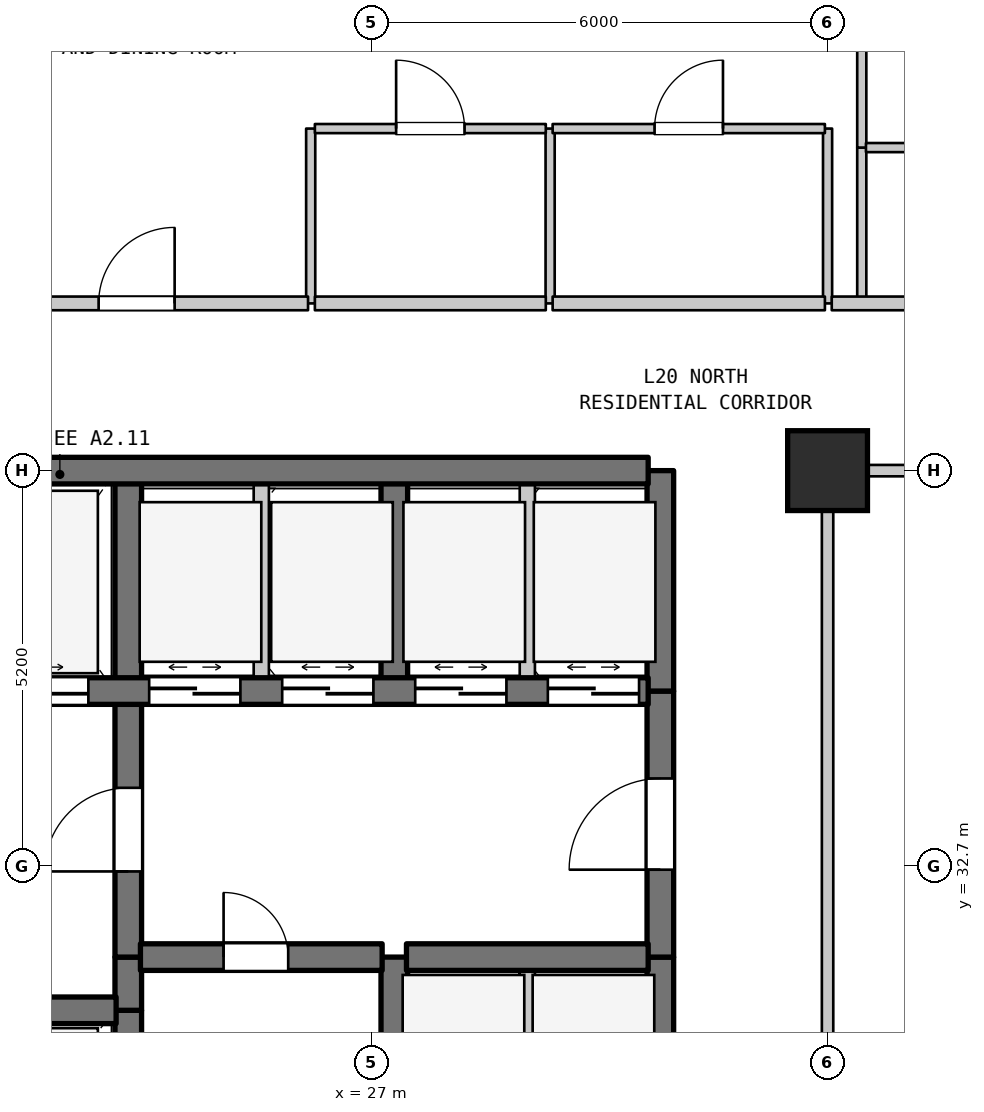
"""IFC4 building model, lengths in metres.
Left out: names, types, materials, properties, quantities, classifications, styles, units other than length and angle.
Written with IfcOpenShell. Run it as: python <this file> out.ifc"""

import sys

from ifc_helpers import new_model, si_unit, direction, frame, frame_2d, origin, origin_2d, place, context, subcontext, project, spatial, rectangle, extrude, element, fill, save


model = new_model("IFC4")
c1 = context("Model", 3, precision=1e-05, world=origin(), true_north=direction((0.0, 1.0)))
c2 = subcontext(c1, "Body", "Model", "MODEL_VIEW")
j1 = project(units=[si_unit("LENGTHUNIT", "METRE"), si_unit("PLANEANGLEUNIT", "RADIAN")], contexts=[c1])
p1 = place(None, origin())
s1 = spatial("IfcSite", under=j1, at=p1, CompositionType="ELEMENT")
p2 = place(p1, origin())
s2 = spatial("IfcBuilding", under=s1, at=p2, CompositionType="ELEMENT")
p3 = place(p2, frame((0.0, 0.0, 86.4)))
s3 = spatial("IfcBuildingStorey", under=s2, at=p3, CompositionType="ELEMENT", Elevation=86.4)
p4 = place(p3, frame((33.0, 37.9, 0.0), z_axis=(0.0, 0.0, 1.0), x_axis=(1.0, 0.0, 0.0)))
e1 = element("IfcColumn", 1, at=p4, inside=s3, PredefinedType="COLUMN", context=c2, shape_type="SweptSolid", body=[
    extrude(rectangle(XDim=1.05, YDim=1.05, at=origin_2d()), origin(), (0.0, 0.0, 1.0), 4.5),
])
p5 = place(p3, frame((23.8, 29.5, 0.0), z_axis=(0.0, 0.0, 1.0), x_axis=(0.0, 1.0, 0.0)))
e2 = element("IfcWall", 2, at=p5, inside=s3, PredefinedType="SHEAR", context=c2, shape_type="SweptSolid", body=[
    extrude(rectangle(XDim=1.3, YDim=0.35, at=frame_2d((0.65, 0.0))), origin(), (0.0, 0.0, 1.0), 4.185),
])
p6 = place(p3, frame((23.8, 30.8, 0.0), z_axis=(0.0, 0.0, 1.0), x_axis=(0.0, 1.0, 0.0)))
e3 = element("IfcWall", 3, at=p6, inside=s3, PredefinedType="SHEAR", context=c2, shape_type="SweptSolid", body=[
    extrude(rectangle(XDim=0.7, YDim=0.35, at=frame_2d((0.35, 0.0))), origin(), (0.0, 0.0, 1.0), 4.185),
])
p7 = place(p3, frame((23.8, 31.5, 0.0), z_axis=(0.0, 0.0, 1.0), x_axis=(0.0, 1.0, 0.0)))
e4 = element("IfcWall", 4, at=p7, inside=s3, PredefinedType="SHEAR", context=c2, shape_type="SweptSolid", body=[
    extrude(rectangle(XDim=3.5, YDim=0.35, at=frame_2d((1.75, 0.0))), origin(), (0.0, 0.0, 1.0), 4.185),
])
p8 = place(p7, frame((1.127, 0.0, 0.0)))
e5 = element("IfcOpeningElement", 5, at=p8, cuts=e4, PredefinedType="OPENING", context=c2, shape_type="SweptSolid", body=[
    extrude(rectangle(XDim=1.1, YDim=2.15, at=frame_2d((0.55, 1.075))), frame((0.0, 0.185, 0.0), z_axis=(0.0, -1.0, 0.0), x_axis=(1.0, 0.0, 0.0)), (0.0, 0.0, 1.0), 0.37),
])
p9 = place(p3, frame((23.8, 35.0, 0.0), z_axis=(0.0, 0.0, 1.0), x_axis=(0.0, 1.0, 0.0)))
e6 = element("IfcWall", 6, at=p9, inside=s3, PredefinedType="SHEAR", context=c2, shape_type="SweptSolid", body=[
    extrude(rectangle(XDim=2.9, YDim=0.35, at=frame_2d((1.45, 0.0))), origin(), (0.0, 0.0, 1.0), 4.185),
])
p10 = place(p3, frame((25.55, 35.0, 0.0), z_axis=(0.0, 0.0, 1.0), x_axis=(0.0, 1.0, 0.0)))
e7 = element("IfcWall", 7, at=p10, inside=s3, PredefinedType="STANDARD", context=c2, shape_type="SweptSolid", body=[
    extrude(rectangle(XDim=2.9, YDim=0.2, at=frame_2d((1.45, 0.0))), origin(), (0.0, 0.0, 1.0), 4.185),
])
p11 = place(p3, frame((26.2, 40.1, 0.0), z_axis=(0.0, 0.0, 1.0), x_axis=(0.0, 1.0, 0.0)))
e8 = element("IfcWall", 8, at=p11, inside=s3, PredefinedType="PARTITIONING", context=c2, shape_type="SweptSolid", body=[
    extrude(rectangle(XDim=2.3, YDim=0.12, at=frame_2d((1.15, 0.0))), origin(), (0.0, 0.0, 1.0), 4.185),
])
p12 = place(p3, frame((27.3, 29.5, 0.0), z_axis=(0.0, 0.0, 1.0), x_axis=(0.0, 1.0, 0.0)))
e9 = element("IfcWall", 9, at=p12, inside=s3, PredefinedType="SHEAR", context=c2, shape_type="SweptSolid", body=[
    extrude(rectangle(XDim=2.0, YDim=0.35, at=frame_2d((1.0, 0.0))), origin(), (0.0, 0.0, 1.0), 4.185),
])
p13 = place(p3, frame((27.3, 35.0, 0.0), z_axis=(0.0, 0.0, 1.0), x_axis=(0.0, 1.0, 0.0)))
e10 = element("IfcWall", 10, at=p13, inside=s3, PredefinedType="SHEAR", context=c2, shape_type="SweptSolid", body=[
    extrude(rectangle(XDim=2.9, YDim=0.35, at=frame_2d((1.45, 0.0))), origin(), (0.0, 0.0, 1.0), 4.185),
])
p14 = place(p3, frame((29.05, 28.9, 0.0), z_axis=(0.0, 0.0, 1.0), x_axis=(0.0, 1.0, 0.0)))
e11 = element("IfcWall", 11, at=p14, inside=s3, PredefinedType="STANDARD", context=c2, shape_type="SweptSolid", body=[
    extrude(rectangle(XDim=2.6, YDim=0.2, at=frame_2d((1.3, 0.0))), origin(), (0.0, 0.0, 1.0), 4.185),
])
p15 = place(p3, frame((29.05, 35.0, 0.0), z_axis=(0.0, 0.0, 1.0), x_axis=(0.0, 1.0, 0.0)))
e12 = element("IfcWall", 12, at=p15, inside=s3, PredefinedType="STANDARD", context=c2, shape_type="SweptSolid", body=[
    extrude(rectangle(XDim=2.9, YDim=0.2, at=frame_2d((1.45, 0.0))), origin(), (0.0, 0.0, 1.0), 4.185),
])
p16 = place(p3, frame((29.35, 40.1, 0.0), z_axis=(0.0, 0.0, 1.0), x_axis=(0.0, 1.0, 0.0)))
e13 = element("IfcWall", 13, at=p16, inside=s3, PredefinedType="PARTITIONING", context=c2, shape_type="SweptSolid", body=[
    extrude(rectangle(XDim=2.3, YDim=0.12, at=frame_2d((1.15, 0.0))), origin(), (0.0, 0.0, 1.0), 4.185),
])
p17 = place(p3, frame((30.8, 28.9, 0.0), z_axis=(0.0, 0.0, 1.0), x_axis=(0.0, 1.0, 0.0)))
e14 = element("IfcWall", 14, at=p17, inside=s3, PredefinedType="SHEAR", context=c2, shape_type="SweptSolid", body=[
    extrude(rectangle(XDim=2.6, YDim=0.35, at=frame_2d((1.3, 0.0))), origin(), (0.0, 0.0, 1.0), 4.185),
])
p18 = place(p3, frame((30.8, 31.5, 0.0), z_axis=(0.0, 0.0, 1.0), x_axis=(0.0, 1.0, 0.0)))
e15 = element("IfcWall", 15, at=p18, inside=s3, PredefinedType="SHEAR", context=c2, shape_type="SweptSolid", body=[
    extrude(rectangle(XDim=3.5, YDim=0.35, at=frame_2d((1.75, 0.0))), origin(), (0.0, 0.0, 1.0), 4.185),
])
p19 = place(p18, frame((1.15, 0.0, 0.0)))
e16 = element("IfcOpeningElement", 16, at=p19, cuts=e15, PredefinedType="OPENING", context=c2, shape_type="SweptSolid", body=[
    extrude(rectangle(XDim=1.2, YDim=2.2, at=frame_2d((0.6, 1.1))), frame((0.0, 0.185, 0.0), z_axis=(0.0, -1.0, 0.0), x_axis=(1.0, 0.0, 0.0)), (0.0, 0.0, 1.0), 0.37),
])
p20 = place(p3, frame((30.8, 35.0, 0.0), z_axis=(0.0, 0.0, 1.0), x_axis=(0.0, 1.0, 0.0)))
e17 = element("IfcWall", 17, at=p20, inside=s3, PredefinedType="SHEAR", context=c2, shape_type="SweptSolid", body=[
    extrude(rectangle(XDim=2.9, YDim=0.35, at=frame_2d((1.45, 0.0))), origin(), (0.0, 0.0, 1.0), 4.185),
])
p21 = place(p3, frame((33.0, 27.91, 0.0), z_axis=(0.0, 0.0, 1.0), x_axis=(0.0, 1.0, 0.0)))
e18 = element("IfcWall", 18, at=p21, inside=s3, PredefinedType="STANDARD", context=c2, shape_type="SweptSolid", body=[
    extrude(rectangle(XDim=9.98, YDim=0.15, at=frame_2d((4.99, 0.0))), origin(), (0.0, 0.0, 1.0), 3.685),
])
p22 = place(p3, frame((33.0, 40.1, 0.0), z_axis=(0.0, 0.0, 1.0), x_axis=(0.0, 1.0, 0.0)))
e19 = element("IfcWall", 19, at=p22, inside=s3, PredefinedType="PARTITIONING", context=c2, shape_type="SweptSolid", body=[
    extrude(rectangle(XDim=2.3, YDim=0.12, at=frame_2d((1.15, 0.0))), origin(), (0.0, 0.0, 1.0), 3.585),
])
p23 = place(p3, frame((33.45, 40.1, 0.0), z_axis=(0.0, 0.0, 1.0), x_axis=(0.0, 1.0, 0.0)))
e20 = element("IfcWall", 20, at=p23, inside=s3, PredefinedType="PARTITIONING", context=c2, shape_type="SweptSolid", body=[
    extrude(rectangle(XDim=2.05, YDim=0.12, at=frame_2d((1.025, 0.0))), origin(), (0.0, 0.0, 1.0), 4.185),
])
p24 = place(p3, frame((33.45, 42.15, 0.0), z_axis=(0.0, 0.0, 1.0), x_axis=(0.0, 1.0, 0.0)))
e21 = element("IfcWall", 21, at=p24, inside=s3, PredefinedType="PARTITIONING", context=c2, shape_type="SweptSolid", body=[
    extrude(rectangle(XDim=3.3, YDim=0.12, at=frame_2d((1.65, 0.0))), origin(), (0.0, 0.0, 1.0), 4.185),
])
p25 = place(p3, frame((19.16, 30.8, 0.0), z_axis=(0.0, 0.0, 1.0), x_axis=(1.0, 0.0, 0.0)))
e22 = element("IfcWall", 22, at=p25, inside=s3, PredefinedType="SHEAR", context=c2, shape_type="SweptSolid", body=[
    extrude(rectangle(XDim=4.48, YDim=0.35, at=frame_2d((2.24, 0.0))), origin(), (0.0, 0.0, 1.0), 4.185),
])
p26 = place(p3, frame((23.96, 31.5, 0.0), z_axis=(0.0, 0.0, 1.0), x_axis=(1.0, 0.0, 0.0)))
e23 = element("IfcWall", 23, at=p26, inside=s3, PredefinedType="SHEAR", context=c2, shape_type="SweptSolid", body=[
    extrude(rectangle(XDim=3.18, YDim=0.35, at=frame_2d((1.59, 0.0))), origin(), (0.0, 0.0, 1.0), 4.185),
])
p27 = place(p26, frame((1.094, 0.0, 0.0)))
e24 = element("IfcOpeningElement", 24, at=p27, cuts=e23, PredefinedType="OPENING", context=c2, shape_type="SweptSolid", body=[
    extrude(rectangle(XDim=0.85, YDim=2.1, at=frame_2d((0.425, 1.05))), frame((0.0, 0.185, 0.0), z_axis=(0.0, -1.0, 0.0), x_axis=(1.0, 0.0, 0.0)), (0.0, 0.0, 1.0), 0.37),
])
p28 = place(p3, frame((27.46, 31.5, 0.0), z_axis=(0.0, 0.0, 1.0), x_axis=(1.0, 0.0, 0.0)))
e25 = element("IfcWall", 25, at=p28, inside=s3, PredefinedType="SHEAR", context=c2, shape_type="SweptSolid", body=[
    extrude(rectangle(XDim=3.18, YDim=0.35, at=frame_2d((1.59, 0.0))), origin(), (0.0, 0.0, 1.0), 4.185),
])
p29 = place(p3, frame((19.16, 35.0, 0.0), z_axis=(0.0, 0.0, 1.0), x_axis=(1.0, 0.0, 0.0)))
e26 = element("IfcWall", 26, at=p29, inside=s3, PredefinedType="SHEAR", context=c2, shape_type="SweptSolid", body=[
    extrude(rectangle(XDim=11.48, YDim=0.35, at=frame_2d((5.74, 0.0))), origin(), (0.0, 0.0, 1.0), 4.185),
])
p30 = place(p29, frame((0.365, 0.0, 0.0)))
e27 = element("IfcOpeningElement", 27, at=p30, cuts=e26, PredefinedType="OPENING", context=c2, shape_type="SweptSolid", body=[
    extrude(rectangle(XDim=1.35, YDim=2.2, at=frame_2d((0.675, 1.1))), frame((0.0, 0.185, 0.0), z_axis=(0.0, -1.0, 0.0), x_axis=(1.0, 0.0, 0.0)), (0.0, 0.0, 1.0), 0.37),
])
p31 = place(p29, frame((2.765, 0.0, 0.0)))
e28 = element("IfcOpeningElement", 28, at=p31, cuts=e26, PredefinedType="OPENING", context=c2, shape_type="SweptSolid", body=[
    extrude(rectangle(XDim=1.35, YDim=2.2, at=frame_2d((0.675, 1.1))), frame((0.0, 0.185, 0.0), z_axis=(0.0, -1.0, 0.0), x_axis=(1.0, 0.0, 0.0)), (0.0, 0.0, 1.0), 0.37),
])
p32 = place(p29, frame((4.915, 0.0, 0.0)))
e29 = element("IfcOpeningElement", 29, at=p32, cuts=e26, PredefinedType="OPENING", context=c2, shape_type="SweptSolid", body=[
    extrude(rectangle(XDim=1.2, YDim=2.2, at=frame_2d((0.6, 1.1))), frame((0.0, 0.185, 0.0), z_axis=(0.0, -1.0, 0.0), x_axis=(1.0, 0.0, 0.0)), (0.0, 0.0, 1.0), 0.37),
])
p33 = place(p29, frame((6.665, 0.0, 0.0)))
e30 = element("IfcOpeningElement", 30, at=p33, cuts=e26, PredefinedType="OPENING", context=c2, shape_type="SweptSolid", body=[
    extrude(rectangle(XDim=1.2, YDim=2.2, at=frame_2d((0.6, 1.1))), frame((0.0, 0.185, 0.0), z_axis=(0.0, -1.0, 0.0), x_axis=(1.0, 0.0, 0.0)), (0.0, 0.0, 1.0), 0.37),
])
p34 = place(p29, frame((8.415, 0.0, 0.0)))
e31 = element("IfcOpeningElement", 31, at=p34, cuts=e26, PredefinedType="OPENING", context=c2, shape_type="SweptSolid", body=[
    extrude(rectangle(XDim=1.2, YDim=2.2, at=frame_2d((0.6, 1.1))), frame((0.0, 0.185, 0.0), z_axis=(0.0, -1.0, 0.0), x_axis=(1.0, 0.0, 0.0)), (0.0, 0.0, 1.0), 0.37),
])
p35 = place(p29, frame((10.16, 0.0, 0.0)))
e32 = element("IfcOpeningElement", 32, at=p35, cuts=e26, PredefinedType="OPENING", context=c2, shape_type="SweptSolid", body=[
    extrude(rectangle(XDim=1.2, YDim=2.2, at=frame_2d((0.6, 1.1))), frame((0.0, 0.185, 0.0), z_axis=(0.0, -1.0, 0.0), x_axis=(1.0, 0.0, 0.0)), (0.0, 0.0, 1.0), 0.37),
])
p36 = place(p3, frame((19.16, 37.9, 0.0), z_axis=(0.0, 0.0, 1.0), x_axis=(1.0, 0.0, 0.0)))
e33 = element("IfcWall", 33, at=p36, inside=s3, PredefinedType="SHEAR", context=c2, shape_type="SweptSolid", body=[
    extrude(rectangle(XDim=11.48, YDim=0.35, at=frame_2d((5.74, 0.0))), origin(), (0.0, 0.0, 1.0), 4.185),
])
p37 = place(p3, frame((33.07, 37.9, 0.0), z_axis=(0.0, 0.0, 1.0), x_axis=(1.0, 0.0, 0.0)))
e34 = element("IfcWall", 34, at=p37, inside=s3, PredefinedType="STANDARD", context=c2, shape_type="SweptSolid", body=[
    extrude(rectangle(XDim=26.935, YDim=0.15, at=frame_2d((13.467, 0.0))), origin(), (0.0, 0.0, 1.0), 4.185),
])
p38 = place(p37, frame((12.96, 0.0, 0.0)))
e35 = element("IfcOpeningElement", 35, at=p38, cuts=e34, PredefinedType="OPENING", context=c2, shape_type="SweptSolid", body=[
    extrude(rectangle(XDim=1.0, YDim=2.15, at=frame_2d((0.5, 1.075))), frame((0.0, 0.085, 0.0), z_axis=(0.0, -1.0, 0.0), x_axis=(1.0, 0.0, 0.0)), (0.0, 0.0, 1.0), 0.17),
])
p39 = place(p3, frame((21.655, 40.1, 0.0), z_axis=(0.0, 0.0, 1.0), x_axis=(1.0, 0.0, 0.0)))
e36 = element("IfcWall", 36, at=p39, inside=s3, PredefinedType="STANDARD", context=c2, shape_type="SweptSolid", body=[
    extrude(rectangle(XDim=4.51, YDim=0.18, at=frame_2d((2.255, 0.0))), origin(), (0.0, 0.0, 1.0), 4.185),
])
p40 = place(p39, frame((1.755, 0.0, 0.0)))
e37 = element("IfcOpeningElement", 37, at=p40, cuts=e36, PredefinedType="OPENING", context=c2, shape_type="SweptSolid", body=[
    extrude(rectangle(XDim=1.0, YDim=2.15, at=frame_2d((0.5, 1.075))), frame((0.0, 0.1, 0.0), z_axis=(0.0, -1.0, 0.0), x_axis=(1.0, 0.0, 0.0)), (0.0, 0.0, 1.0), 0.2),
])
p41 = place(p3, frame((26.255, 40.1, 0.0), z_axis=(0.0, 0.0, 1.0), x_axis=(1.0, 0.0, 0.0)))
e38 = element("IfcWall", 38, at=p41, inside=s3, PredefinedType="STANDARD", context=c2, shape_type="SweptSolid", body=[
    extrude(rectangle(XDim=3.038, YDim=0.18, at=frame_2d((1.519, 0.0))), origin(), (0.0, 0.0, 1.0), 4.185),
])
p42 = place(p3, frame((29.383, 40.1, 0.0), z_axis=(0.0, 0.0, 1.0), x_axis=(1.0, 0.0, 0.0)))
e39 = element("IfcWall", 39, at=p42, inside=s3, PredefinedType="STANDARD", context=c2, shape_type="SweptSolid", body=[
    extrude(rectangle(XDim=3.582, YDim=0.18, at=frame_2d((1.791, 0.0))), origin(), (0.0, 0.0, 1.0), 4.185),
])
p43 = place(p3, frame((33.055, 40.1, 0.0), z_axis=(0.0, 0.0, 1.0), x_axis=(1.0, 0.0, 0.0)))
e40 = element("IfcWall", 40, at=p43, inside=s3, PredefinedType="STANDARD", context=c2, shape_type="SweptSolid", body=[
    extrude(rectangle(XDim=5.545, YDim=0.18, at=frame_2d((2.772, 0.0))), origin(), (0.0, 0.0, 1.0), 4.185),
])
p44 = place(p43, frame((2.435, 0.0, 0.0)))
e41 = element("IfcOpeningElement", 41, at=p44, cuts=e40, PredefinedType="OPENING", context=c2, shape_type="SweptSolid", body=[
    extrude(rectangle(XDim=1.0, YDim=2.15, at=frame_2d((0.5, 1.075))), frame((0.0, 0.1, 0.0), z_axis=(0.0, -1.0, 0.0), x_axis=(1.0, 0.0, 0.0)), (0.0, 0.0, 1.0), 0.2),
])
p45 = place(p3, frame((33.505, 42.15, 0.0), z_axis=(0.0, 0.0, 1.0), x_axis=(1.0, 0.0, 0.0)))
e42 = element("IfcWall", 42, at=p45, inside=s3, PredefinedType="PARTITIONING", context=c2, shape_type="SweptSolid", body=[
    extrude(rectangle(XDim=2.16, YDim=0.12, at=frame_2d((1.08, 0.0))), origin(), (0.0, 0.0, 1.0), 4.185),
])
p46 = place(p45, frame((0.553, 0.0, 0.0)))
e43 = element("IfcOpeningElement", 43, at=p46, cuts=e42, PredefinedType="OPENING", context=c2, shape_type="SweptSolid", body=[
    extrude(rectangle(XDim=0.9, YDim=2.15, at=frame_2d((0.45, 1.075))), frame((0.0, 0.07, 0.0), z_axis=(0.0, -1.0, 0.0), x_axis=(1.0, 0.0, 0.0)), (0.0, 0.0, 1.0), 0.14),
])
p47 = place(p3, frame((26.255, 42.4, 0.0), z_axis=(0.0, 0.0, 1.0), x_axis=(1.0, 0.0, 0.0)))
e44 = element("IfcWall", 44, at=p47, inside=s3, PredefinedType="PARTITIONING", context=c2, shape_type="SweptSolid", body=[
    extrude(rectangle(XDim=3.038, YDim=0.12, at=frame_2d((1.519, 0.0))), origin(), (0.0, 0.0, 1.0), 4.185),
])
p48 = place(p47, frame((1.069, 0.0, 0.0)))
e45 = element("IfcOpeningElement", 45, at=p48, cuts=e44, PredefinedType="OPENING", context=c2, shape_type="SweptSolid", body=[
    extrude(rectangle(XDim=0.9, YDim=2.15, at=frame_2d((0.45, 1.075))), frame((0.0, 0.07, 0.0), z_axis=(0.0, -1.0, 0.0), x_axis=(1.0, 0.0, 0.0)), (0.0, 0.0, 1.0), 0.14),
])
p49 = place(p3, frame((29.383, 42.4, 0.0), z_axis=(0.0, 0.0, 1.0), x_axis=(1.0, 0.0, 0.0)))
e46 = element("IfcWall", 46, at=p49, inside=s3, PredefinedType="PARTITIONING", context=c2, shape_type="SweptSolid", body=[
    extrude(rectangle(XDim=3.582, YDim=0.12, at=frame_2d((1.791, 0.0))), origin(), (0.0, 0.0, 1.0), 4.185),
])
p50 = place(p49, frame((1.341, 0.0, 0.0)))
e47 = element("IfcOpeningElement", 47, at=p50, cuts=e46, PredefinedType="OPENING", context=c2, shape_type="SweptSolid", body=[
    extrude(rectangle(XDim=0.9, YDim=2.1, at=frame_2d((0.45, 1.05))), frame((0.0, 0.07, 0.0), z_axis=(0.0, -1.0, 0.0), x_axis=(1.0, 0.0, 0.0)), (0.0, 0.0, 1.0), 0.14),
])
p51 = place(p8, origin())
e48 = element("IfcDoor", 48, at=p51, inside=s3, OperationType="SINGLE_SWING_LEFT", PredefinedType="DOOR", context=c2, shape_type="SweptSolid", body=[
    extrude(rectangle(XDim=1.1, YDim=2.15, at=frame_2d((0.55, 1.075))), frame((0.0, 0.025, 0.0), z_axis=(0.0, -1.0, 0.0), x_axis=(1.0, 0.0, 0.0)), (0.0, 0.0, 1.0), 0.05),
])
fill(e5, e48)
p52 = place(p19, origin())
e49 = element("IfcDoor", 49, at=p52, inside=s3, OperationType="SINGLE_SWING_LEFT", PredefinedType="DOOR", context=c2, shape_type="SweptSolid", body=[
    extrude(rectangle(XDim=1.2, YDim=2.2, at=frame_2d((0.6, 1.1))), frame((0.0, 0.025, 0.0), z_axis=(0.0, -1.0, 0.0), x_axis=(1.0, 0.0, 0.0)), (0.0, 0.0, 1.0), 0.05),
])
fill(e16, e49)
p53 = place(p27, origin())
e50 = element("IfcDoor", 50, at=p53, inside=s3, OperationType="SINGLE_SWING_LEFT", PredefinedType="DOOR", context=c2, shape_type="SweptSolid", body=[
    extrude(rectangle(XDim=0.85, YDim=2.1, at=frame_2d((0.425, 1.05))), frame((0.0, 0.025, 0.0), z_axis=(0.0, -1.0, 0.0), x_axis=(1.0, 0.0, 0.0)), (0.0, 0.0, 1.0), 0.05),
])
fill(e24, e50)
p54 = place(p31, origin())
e51 = element("IfcDoor", 51, at=p54, inside=s3, OperationType="DOUBLE_DOOR_SLIDING", PredefinedType="DOOR", context=c2, shape_type="SweptSolid", body=[
    extrude(rectangle(XDim=1.35, YDim=2.2, at=frame_2d((0.675, 1.1))), frame((0.0, 0.025, 0.0), z_axis=(0.0, -1.0, 0.0), x_axis=(1.0, 0.0, 0.0)), (0.0, 0.0, 1.0), 0.05),
])
fill(e28, e51)
p55 = place(p32, origin())
e52 = element("IfcDoor", 52, at=p55, inside=s3, OperationType="DOUBLE_DOOR_SLIDING", PredefinedType="DOOR", context=c2, shape_type="SweptSolid", body=[
    extrude(rectangle(XDim=1.2, YDim=2.2, at=frame_2d((0.6, 1.1))), frame((0.0, 0.025, 0.0), z_axis=(0.0, -1.0, 0.0), x_axis=(1.0, 0.0, 0.0)), (0.0, 0.0, 1.0), 0.05),
])
fill(e29, e52)
p56 = place(p33, origin())
e53 = element("IfcDoor", 53, at=p56, inside=s3, OperationType="DOUBLE_DOOR_SLIDING", PredefinedType="DOOR", context=c2, shape_type="SweptSolid", body=[
    extrude(rectangle(XDim=1.2, YDim=2.2, at=frame_2d((0.6, 1.1))), frame((0.0, 0.025, 0.0), z_axis=(0.0, -1.0, 0.0), x_axis=(1.0, 0.0, 0.0)), (0.0, 0.0, 1.0), 0.05),
])
fill(e30, e53)
p57 = place(p34, origin())
e54 = element("IfcDoor", 54, at=p57, inside=s3, OperationType="DOUBLE_DOOR_SLIDING", PredefinedType="DOOR", context=c2, shape_type="SweptSolid", body=[
    extrude(rectangle(XDim=1.2, YDim=2.2, at=frame_2d((0.6, 1.1))), frame((0.0, 0.025, 0.0), z_axis=(0.0, -1.0, 0.0), x_axis=(1.0, 0.0, 0.0)), (0.0, 0.0, 1.0), 0.05),
])
fill(e31, e54)
p58 = place(p35, origin())
e55 = element("IfcDoor", 55, at=p58, inside=s3, OperationType="DOUBLE_DOOR_SLIDING", PredefinedType="DOOR", context=c2, shape_type="SweptSolid", body=[
    extrude(rectangle(XDim=1.2, YDim=2.2, at=frame_2d((0.6, 1.1))), frame((0.0, 0.025, 0.0), z_axis=(0.0, -1.0, 0.0), x_axis=(1.0, 0.0, 0.0)), (0.0, 0.0, 1.0), 0.05),
])
fill(e32, e55)
p59 = place(p40, origin())
e56 = element("IfcDoor", 56, at=p59, inside=s3, OperationType="SINGLE_SWING_RIGHT", PredefinedType="DOOR", context=c2, shape_type="SweptSolid", body=[
    extrude(rectangle(XDim=1.0, YDim=2.15, at=frame_2d((0.5, 1.075))), frame((0.0, 0.025, 0.0), z_axis=(0.0, -1.0, 0.0), x_axis=(1.0, 0.0, 0.0)), (0.0, 0.0, 1.0), 0.05),
])
fill(e37, e56)
p60 = place(p48, origin())
e57 = element("IfcDoor", 57, at=p60, inside=s3, OperationType="SINGLE_SWING_LEFT", PredefinedType="DOOR", context=c2, shape_type="SweptSolid", body=[
    extrude(rectangle(XDim=0.9, YDim=2.15, at=frame_2d((0.45, 1.075))), frame((0.0, 0.025, 0.0), z_axis=(0.0, -1.0, 0.0), x_axis=(1.0, 0.0, 0.0)), (0.0, 0.0, 1.0), 0.05),
])
fill(e45, e57)
p61 = place(p50, origin())
e58 = element("IfcDoor", 58, at=p61, inside=s3, OperationType="SINGLE_SWING_RIGHT", PredefinedType="DOOR", context=c2, shape_type="SweptSolid", body=[
    extrude(rectangle(XDim=0.9, YDim=2.1, at=frame_2d((0.45, 1.05))), frame((0.0, 0.025, 0.0), z_axis=(0.0, -1.0, 0.0), x_axis=(1.0, 0.0, 0.0)), (0.0, 0.0, 1.0), 0.05),
])
fill(e47, e58)
save(model, sys.argv[1])
